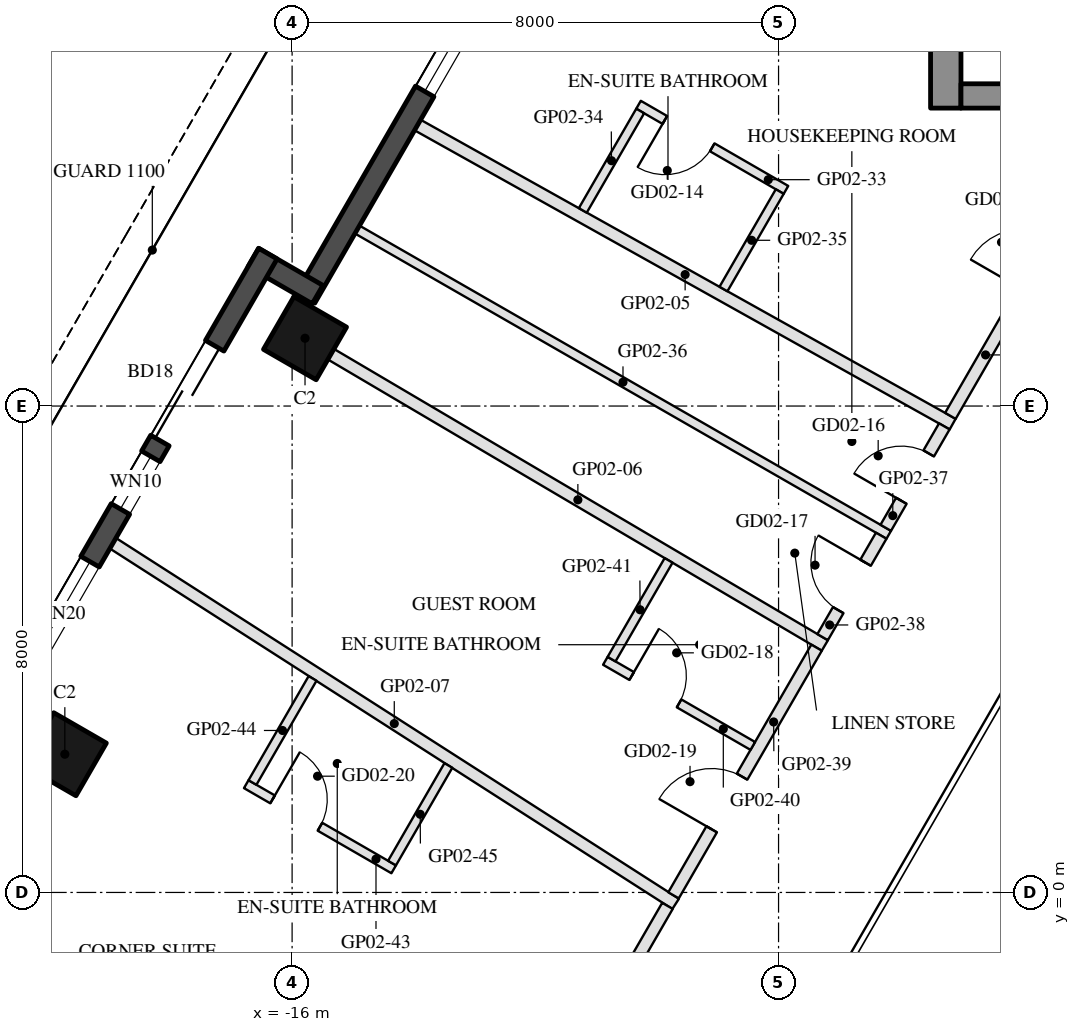
"""IFC4 building model, lengths in metres.
Left out: names, types, materials, properties, quantities, classifications, styles, units other than length and angle.
Written with IfcOpenShell. Run it as: python <this file> out.ifc"""

import sys

from ifc_helpers import new_model, si_unit, direction, frame, frame_2d, origin, origin_2d, place, context, subcontext, project, spatial, rectangle, hollow_rectangle, extrude, element, fill, save


model = new_model("IFC4")
c1 = context("Model", 3, precision=1e-05, world=origin(), true_north=direction((0.0, 1.0)))
c2 = subcontext(c1, "Body", "Model", "MODEL_VIEW")
j1 = project(units=[si_unit("LENGTHUNIT", "METRE"), si_unit("PLANEANGLEUNIT", "RADIAN")], contexts=[c1])
p1 = place(None, origin())
s1 = spatial("IfcSite", under=j1, at=p1, CompositionType="ELEMENT")
p2 = place(p1, origin())
s2 = spatial("IfcBuilding", under=s1, at=p2, CompositionType="ELEMENT")
p3 = place(p2, frame((0.0, 0.0, 57.6)))
s3 = spatial("IfcBuildingStorey", under=s2, at=p3, CompositionType="ELEMENT", Elevation=57.6)
for number, where, z_axis, x_axis in (
    (1, (-15.788, 9.115, 0.0), (0.0, 0.0, 1.0), (0.5, 0.866, 0.0)),
    (2, (-19.738, 2.273, 0.0), (0.0, 0.0, 1.0), (0.5, 0.866, 0.0)),
):
    element("IfcColumn", number, at=place(p3, frame(where, z_axis=z_axis, x_axis=x_axis)), inside=s3, PredefinedType="COLUMN", context=c2, shape_type="SweptSolid", body=[
        extrude(hollow_rectangle(XDim=1.0, YDim=1.0, WallThickness=0.045, at=origin_2d()), origin(), (0.0, 0.0, 1.0), 3.7),
    ])
p4 = place(p3, frame((-12.409, 15.617, 0.0), z_axis=(0.0, 0.0, 1.0), x_axis=(-0.500003597184, -0.866023326939, 0.0)))
e3 = element("IfcWall", 3, at=p4, inside=s3, PredefinedType="SOLIDWALL", context=c2, shape_type="SweptSolid", body=[
    extrude(rectangle(XDim=6.74, YDim=0.35, at=frame_2d((3.37, 0.0))), origin(), (0.0, 0.0, 1.0), 3.55),
])
p5 = place(p4, frame((0.32, 0.0, 0.3)))
e4 = element("IfcOpeningElement", 4, at=p5, cuts=e3, PredefinedType="OPENING", context=c2, shape_type="SweptSolid", body=[
    extrude(rectangle(XDim=2.5, YDim=2.65, at=frame_2d((1.25, 1.325))), frame((0.0, 0.185, 0.0), z_axis=(0.0, -1.0, 0.0), x_axis=(1.0, 0.0, 0.0)), (0.0, 0.0, 1.0), 0.37),
])
p6 = place(p3, frame((-15.581, 9.833, 0.0), z_axis=(0.0, 0.0, 1.0), x_axis=(-0.866055662726, 0.499947586314, 0.0)))
e5 = element("IfcWall", 5, at=p6, inside=s3, PredefinedType="SOLIDWALL", context=c2, shape_type="SweptSolid", body=[
    extrude(rectangle(XDim=1.22, YDim=0.35, at=frame_2d((0.61, 0.0))), origin(), (0.0, 0.0, 1.0), 3.55),
])
p7 = place(p3, frame((-16.398, 10.507, 0.0), z_axis=(0.0, 0.0, 1.0), x_axis=(-0.499999142773, -0.866025898704, 0.0)))
e6 = element("IfcWall", 6, at=p7, inside=s3, PredefinedType="SOLIDWALL", context=c2, shape_type="SweptSolid", body=[
    extrude(rectangle(XDim=9.7, YDim=0.35, at=frame_2d((4.85, 0.0))), origin(), (0.0, 0.0, 1.0), 3.55),
])
p8 = place(p7, frame((1.75, 0.0, 0.0)))
e7 = element("IfcOpeningElement", 7, at=p8, cuts=e6, PredefinedType="OPENING", context=c2, shape_type="SweptSolid", body=[
    extrude(rectangle(XDim=1.8, YDim=2.4, at=frame_2d((0.9, 1.2))), frame((0.0, 0.185, 0.0), z_axis=(0.0, -1.0, 0.0), x_axis=(1.0, 0.0, 0.0)), (0.0, 0.0, 1.0), 0.37),
])
p9 = place(p7, frame((3.85, 0.0, 0.3)))
e8 = element("IfcOpeningElement", 8, at=p9, cuts=e6, PredefinedType="OPENING", context=c2, shape_type="SweptSolid", body=[
    extrude(rectangle(XDim=1.0, YDim=2.65, at=frame_2d((0.5, 1.325))), frame((0.0, 0.185, 0.0), z_axis=(0.0, -1.0, 0.0), x_axis=(1.0, 0.0, 0.0)), (0.0, 0.0, 1.0), 0.37),
])
p10 = place(p7, frame((5.85, 0.0, 0.3)))
e9 = element("IfcOpeningElement", 9, at=p10, cuts=e6, PredefinedType="OPENING", context=c2, shape_type="SweptSolid", body=[
    extrude(rectangle(XDim=2.0, YDim=2.65, at=frame_2d((1.0, 1.325))), frame((0.0, 0.185, 0.0), z_axis=(0.0, -1.0, 0.0), x_axis=(1.0, 0.0, 0.0)), (0.0, 0.0, 1.0), 0.37),
])
p11 = place(p3, frame((-5.25, 12.9, 0.0), z_axis=(0.0, 0.0, 1.0), x_axis=(0.0, 1.0, 0.0)))
e10 = element("IfcWall", 10, at=p11, inside=s3, PredefinedType="SHEAR", context=c2, shape_type="SweptSolid", body=[
    extrude(rectangle(XDim=14.837, YDim=0.5, at=frame_2d((7.418, 0.0))), origin(), (0.0, 0.0, 1.0), 3.5),
])
p12 = place(p3, frame((5.0, 13.1, 0.0), z_axis=(0.0, 0.0, 1.0), x_axis=(-1.0, 0.0, 0.0)))
e11 = element("IfcWall", 11, at=p12, inside=s3, PredefinedType="SHEAR", context=c2, shape_type="SweptSolid", body=[
    extrude(rectangle(XDim=10.0, YDim=0.4, at=frame_2d((5.0, 0.0))), origin(), (0.0, 0.0, 1.0), 3.5),
])
p13 = place(p12, frame((3.55, 0.0, 0.0)))
e12 = element("IfcOpeningElement", 12, at=p13, cuts=e11, PredefinedType="OPENING", context=c2, shape_type="SweptSolid", body=[
    extrude(rectangle(XDim=1.1, YDim=2.1, at=frame_2d((0.55, 1.05))), frame((0.0, 0.21, 0.0), z_axis=(0.0, -1.0, 0.0), x_axis=(1.0, 0.0, 0.0)), (0.0, 0.0, 1.0), 0.42),
])
p14 = place(p12, frame((5.85, 0.0, 0.0)))
e13 = element("IfcOpeningElement", 13, at=p14, cuts=e11, PredefinedType="OPENING", context=c2, shape_type="SweptSolid", body=[
    extrude(rectangle(XDim=1.4, YDim=2.1, at=frame_2d((0.7, 1.05))), frame((0.0, 0.21, 0.0), z_axis=(0.0, -1.0, 0.0), x_axis=(1.0, 0.0, 0.0)), (0.0, 0.0, 1.0), 0.42),
])
p15 = place(p3, frame((-13.936, 12.622, 0.0), z_axis=(0.0, 0.0, 1.0), x_axis=(0.872898889426, -0.487901146585, 0.0)))
e14 = element("IfcWall", 14, at=p15, inside=s3, PredefinedType="PARTITIONING", context=c2, shape_type="SweptSolid", body=[
    extrude(rectangle(XDim=10.081, YDim=0.2, at=frame_2d((5.041, 0.0))), origin(), (0.0, 0.0, 1.0), 2.95),
])
p16 = place(p3, frame((-15.362, 8.853, 0.0), z_axis=(0.0, 0.0, 1.0), x_axis=(0.861347313363, -0.508016540835, 0.0)))
e15 = element("IfcWall", 15, at=p16, inside=s3, PredefinedType="PARTITIONING", context=c2, shape_type="SweptSolid", body=[
    extrude(rectangle(XDim=9.43, YDim=0.2, at=frame_2d((4.715, 0.0))), origin(), (0.0, 0.0, 1.0), 2.95),
])
p17 = place(p3, frame((-18.947, 5.743, 0.0), z_axis=(0.0, 0.0, 1.0), x_axis=(0.84192674528, -0.539591841657, 0.0)))
e16 = element("IfcWall", 16, at=p17, inside=s3, PredefinedType="PARTITIONING", context=c2, shape_type="SweptSolid", body=[
    extrude(rectangle(XDim=10.992, YDim=0.2, at=frame_2d((5.496, 0.0))), origin(), (0.0, 0.0, 1.0), 2.96),
])
p18 = place(p3, frame((-5.174, 7.838, 0.0), z_axis=(0.0, 0.0, 1.0), x_axis=(0.499973220989, 0.866040864101, 0.0)))
e17 = element("IfcWall", 17, at=p18, inside=s3, PredefinedType="PARTITIONING", context=c2, shape_type="SweptSolid", body=[
    extrude(rectangle(XDim=5.787, YDim=0.2, at=frame_2d((2.894, 0.0))), origin(), (0.0, 0.0, 1.0), 2.95),
])
p19 = place(p18, frame((2.393, 0.0, 0.0)))
e18 = element("IfcOpeningElement", 18, at=p19, cuts=e17, PredefinedType="OPENING", context=c2, shape_type="SweptSolid", body=[
    extrude(rectangle(XDim=1.0, YDim=2.1, at=frame_2d((0.5, 1.05))), frame((0.0, 0.11, 0.0), z_axis=(0.0, -1.0, 0.0), x_axis=(1.0, 0.0, 0.0)), (0.0, 0.0, 1.0), 0.22),
])
p20 = place(p3, frame((-7.878, 11.555, 0.0), z_axis=(0.0, 0.0, 1.0), x_axis=(-0.865996816683, 0.500049511043, 0.0)))
e19 = element("IfcWall", 19, at=p20, inside=s3, PredefinedType="PARTITIONING", context=c2, shape_type="SweptSolid", body=[
    extrude(rectangle(XDim=2.8, YDim=0.15, at=frame_2d((1.4, 0.0))), origin(), (0.0, 0.0, 1.0), 3.55),
])
p21 = place(p20, frame((1.4, 0.0, 0.0)))
e20 = element("IfcOpeningElement", 20, at=p21, cuts=e19, PredefinedType="OPENING", context=c2, shape_type="SweptSolid", body=[
    extrude(rectangle(XDim=0.9, YDim=2.1, at=frame_2d((0.45, 1.05))), frame((0.0, 0.085, 0.0), z_axis=(0.0, -1.0, 0.0), x_axis=(1.0, 0.0, 0.0)), (0.0, 0.0, 1.0), 0.17),
])
p22 = place(p3, frame((-10.275, 12.853, 0.0), z_axis=(0.0, 0.0, 1.0), x_axis=(-0.499950073403, -0.866054227, 0.0)))
e21 = element("IfcWall", 21, at=p22, inside=s3, PredefinedType="PARTITIONING", context=c2, shape_type="SweptSolid", body=[
    extrude(rectangle(XDim=1.888, YDim=0.15, at=frame_2d((0.944, 0.0))), origin(), (0.0, 0.0, 1.0), 3.55),
])
p23 = place(p3, frame((-7.98, 11.528, 0.0), z_axis=(0.0, 0.0, 1.0), x_axis=(-0.500011685716, -0.866018656928, 0.0)))
e22 = element("IfcWall", 22, at=p23, inside=s3, PredefinedType="PARTITIONING", context=c2, shape_type="SweptSolid", body=[
    extrude(rectangle(XDim=1.851, YDim=0.15, at=frame_2d((0.926, 0.0))), origin(), (0.0, 0.0, 1.0), 3.55),
])
p24 = place(p3, frame((-14.929, 10.902, 0.0), z_axis=(0.0, 0.0, 1.0), x_axis=(0.867191892367, -0.497974117614, 0.0)))
e23 = element("IfcWall", 23, at=p24, inside=s3, PredefinedType="PARTITIONING", context=c2, shape_type="SweptSolid", body=[
    extrude(rectangle(XDim=10.08, YDim=0.15, at=frame_2d((5.04, 0.0))), origin(), (0.0, 0.0, 1.0), 2.96),
])
p25 = place(p3, frame((-6.237, 5.997, 0.0), z_axis=(0.0, 0.0, 1.0), x_axis=(0.500051616692, 0.865995600822, 0.0)))
e24 = element("IfcWall", 24, at=p25, inside=s3, PredefinedType="PARTITIONING", context=c2, shape_type="SweptSolid", body=[
    extrude(rectangle(XDim=1.926, YDim=0.2, at=frame_2d((0.963, 0.0))), origin(), (0.0, 0.0, 1.0), 2.95),
])
p26 = place(p25, frame((0.513, 0.0, 0.0)))
e25 = element("IfcOpeningElement", 25, at=p26, cuts=e24, PredefinedType="OPENING", context=c2, shape_type="SweptSolid", body=[
    extrude(rectangle(XDim=0.9, YDim=2.1, at=frame_2d((0.45, 1.05))), frame((0.0, 0.11, 0.0), z_axis=(0.0, -1.0, 0.0), x_axis=(1.0, 0.0, 0.0)), (0.0, 0.0, 1.0), 0.22),
])
p27 = place(p3, frame((-7.275, 4.199, 0.0), z_axis=(0.0, 0.0, 1.0), x_axis=(0.500051616692, 0.865995600822, 0.0)))
e26 = element("IfcWall", 26, at=p27, inside=s3, PredefinedType="PARTITIONING", context=c2, shape_type="SweptSolid", body=[
    extrude(rectangle(XDim=1.926, YDim=0.2, at=frame_2d((0.963, 0.0))), origin(), (0.0, 0.0, 1.0), 2.95),
])
p28 = place(p27, frame((0.513, 0.0, 0.0)))
e27 = element("IfcOpeningElement", 27, at=p28, cuts=e26, PredefinedType="OPENING", context=c2, shape_type="SweptSolid", body=[
    extrude(rectangle(XDim=0.9, YDim=2.1, at=frame_2d((0.45, 1.05))), frame((0.0, 0.11, 0.0), z_axis=(0.0, -1.0, 0.0), x_axis=(1.0, 0.0, 0.0)), (0.0, 0.0, 1.0), 0.22),
])
p29 = place(p3, frame((-9.727, -0.047, 0.0), z_axis=(0.0, 0.0, 1.0), x_axis=(0.500019002036, 0.866014432676, 0.0)))
e28 = element("IfcWall", 28, at=p29, inside=s3, PredefinedType="PARTITIONING", context=c2, shape_type="SweptSolid", body=[
    extrude(rectangle(XDim=4.703, YDim=0.2, at=frame_2d((2.352, 0.0))), origin(), (0.0, 0.0, 1.0), 2.95),
])
p30 = place(p29, frame((1.254, 0.0, 0.0)))
e29 = element("IfcOpeningElement", 29, at=p30, cuts=e28, PredefinedType="OPENING", context=c2, shape_type="SweptSolid", body=[
    extrude(rectangle(XDim=1.0, YDim=2.1, at=frame_2d((0.5, 1.05))), frame((0.0, 0.11, 0.0), z_axis=(0.0, -1.0, 0.0), x_axis=(1.0, 0.0, 0.0)), (0.0, 0.0, 1.0), 0.22),
])
p31 = place(p3, frame((-10.849, 3.81, 0.0), z_axis=(0.0, 0.0, 1.0), x_axis=(0.866018616679, -0.500011755427, 0.0)))
e30 = element("IfcWall", 30, at=p31, inside=s3, PredefinedType="PARTITIONING", context=c2, shape_type="SweptSolid", body=[
    extrude(rectangle(XDim=2.8, YDim=0.15, at=frame_2d((1.4, 0.0))), origin(), (0.0, 0.0, 1.0), 3.55),
])
p32 = place(p31, frame((0.5, 0.0, 0.0)))
e31 = element("IfcOpeningElement", 31, at=p32, cuts=e30, PredefinedType="OPENING", context=c2, shape_type="SweptSolid", body=[
    extrude(rectangle(XDim=0.9, YDim=2.1, at=frame_2d((0.45, 1.05))), frame((0.0, 0.085, 0.0), z_axis=(0.0, -1.0, 0.0), x_axis=(1.0, 0.0, 0.0)), (0.0, 0.0, 1.0), 0.17),
])
p33 = place(p3, frame((-9.809, 5.461, 0.0), z_axis=(0.0, 0.0, 1.0), x_axis=(-0.499947857008, -0.866055506462, 0.0)))
e32 = element("IfcWall", 32, at=p33, inside=s3, PredefinedType="PARTITIONING", context=c2, shape_type="SweptSolid", body=[
    extrude(rectangle(XDim=1.875, YDim=0.15, at=frame_2d((0.938, 0.0))), origin(), (0.0, 0.0, 1.0), 3.55),
])
p34 = place(p3, frame((-12.269, -4.45, 0.0), z_axis=(0.0, 0.0, 1.0), x_axis=(0.500021044785, 0.866013253231, 0.0)))
e33 = element("IfcWall", 33, at=p34, inside=s3, PredefinedType="PARTITIONING", context=c2, shape_type="SweptSolid", body=[
    extrude(rectangle(XDim=4.884, YDim=0.2, at=frame_2d((2.442, 0.0))), origin(), (0.0, 0.0, 1.0), 2.95),
])
p35 = place(p34, frame((1.942, 0.0, 0.0)))
e34 = element("IfcOpeningElement", 34, at=p35, cuts=e33, PredefinedType="OPENING", context=c2, shape_type="SweptSolid", body=[
    extrude(rectangle(XDim=1.0, YDim=2.1, at=frame_2d((0.5, 1.05))), frame((0.0, 0.11, 0.0), z_axis=(0.0, -1.0, 0.0), x_axis=(1.0, 0.0, 0.0)), (0.0, 0.0, 1.0), 0.22),
])
p36 = place(p3, frame((-16.754, 1.781, 0.0), z_axis=(0.0, 0.0, 1.0), x_axis=(0.866056369097, -0.49994636267, 0.0)))
e35 = element("IfcWall", 35, at=p36, inside=s3, PredefinedType="PARTITIONING", context=c2, shape_type="SweptSolid", body=[
    extrude(rectangle(XDim=2.8, YDim=0.15, at=frame_2d((1.4, 0.0))), origin(), (0.0, 0.0, 1.0), 3.55),
])
p37 = place(p36, frame((0.5, 0.0, 0.0)))
e36 = element("IfcOpeningElement", 36, at=p37, cuts=e35, PredefinedType="OPENING", context=c2, shape_type="SweptSolid", body=[
    extrude(rectangle(XDim=0.9, YDim=2.1, at=frame_2d((0.45, 1.05))), frame((0.0, 0.085, 0.0), z_axis=(0.0, -1.0, 0.0), x_axis=(1.0, 0.0, 0.0)), (0.0, 0.0, 1.0), 0.17),
])
p38 = place(p3, frame((-15.664, 3.52, 0.0), z_axis=(0.0, 0.0, 1.0), x_axis=(-0.500018274647, -0.866014852655, 0.0)))
e37 = element("IfcWall", 37, at=p38, inside=s3, PredefinedType="PARTITIONING", context=c2, shape_type="SweptSolid", body=[
    extrude(rectangle(XDim=1.977, YDim=0.15, at=frame_2d((0.988, 0.0))), origin(), (0.0, 0.0, 1.0), 3.55),
])
p39 = place(p3, frame((-13.43, 2.088, 0.0), z_axis=(0.0, 0.0, 1.0), x_axis=(-0.499893495202, -0.866086885627, 0.0)))
e38 = element("IfcWall", 38, at=p39, inside=s3, PredefinedType="PARTITIONING", context=c2, shape_type="SweptSolid", body=[
    extrude(rectangle(XDim=1.854, YDim=0.15, at=frame_2d((0.927, 0.0))), origin(), (0.0, 0.0, 1.0), 3.55),
])
p40 = place(p5, origin())
e39 = element("IfcWindow", 39, at=p40, inside=s3, PartitioningType="SINGLE_PANEL", PredefinedType="WINDOW", context=c2, shape_type="SweptSolid", body=[
    extrude(rectangle(XDim=2.5, YDim=2.65, at=frame_2d((1.25, 1.325))), frame((0.0, 0.03, 0.0), z_axis=(0.0, -1.0, 0.0), x_axis=(1.0, 0.0, 0.0)), (0.0, 0.0, 1.0), 0.06),
])
fill(e4, e39)
p41 = place(p8, frame((1.8, 0.0, 0.0), z_axis=(0.0, 0.0, 1.0), x_axis=(-1.0, 0.0, 0.0)))
e40 = element("IfcDoor", 40, at=p41, inside=s3, OperationType="SLIDING_TO_LEFT", PredefinedType="DOOR", context=c2, shape_type="SweptSolid", body=[
    extrude(rectangle(XDim=1.8, YDim=2.4, at=frame_2d((0.9, 1.2))), frame((0.0, 0.025, 0.0), z_axis=(0.0, -1.0, 0.0), x_axis=(1.0, 0.0, 0.0)), (0.0, 0.0, 1.0), 0.05),
])
fill(e7, e40)
p42 = place(p9, origin())
e41 = element("IfcWindow", 41, at=p42, inside=s3, PartitioningType="SINGLE_PANEL", PredefinedType="WINDOW", context=c2, shape_type="SweptSolid", body=[
    extrude(rectangle(XDim=1.0, YDim=2.65, at=frame_2d((0.5, 1.325))), frame((0.0, 0.03, 0.0), z_axis=(0.0, -1.0, 0.0), x_axis=(1.0, 0.0, 0.0)), (0.0, 0.0, 1.0), 0.06),
])
fill(e8, e41)
p43 = place(p10, origin())
e42 = element("IfcWindow", 42, at=p43, inside=s3, PartitioningType="SINGLE_PANEL", PredefinedType="WINDOW", context=c2, shape_type="SweptSolid", body=[
    extrude(rectangle(XDim=2.0, YDim=2.65, at=frame_2d((1.0, 1.325))), frame((0.0, 0.03, 0.0), z_axis=(0.0, -1.0, 0.0), x_axis=(1.0, 0.0, 0.0)), (0.0, 0.0, 1.0), 0.06),
])
fill(e9, e42)
p44 = place(p21, origin())
e43 = element("IfcDoor", 43, at=p44, inside=s3, OperationType="SINGLE_SWING_RIGHT", PredefinedType="DOOR", context=c2, shape_type="SweptSolid", body=[
    extrude(rectangle(XDim=0.9, YDim=2.1, at=frame_2d((0.45, 1.05))), frame((0.0, 0.025, 0.0), z_axis=(0.0, -1.0, 0.0), x_axis=(1.0, 0.0, 0.0)), (0.0, 0.0, 1.0), 0.05),
])
fill(e20, e43)
p45 = place(p26, origin())
e44 = element("IfcDoor", 44, at=p45, inside=s3, OperationType="SINGLE_SWING_LEFT", PredefinedType="DOOR", context=c2, shape_type="SweptSolid", body=[
    extrude(rectangle(XDim=0.9, YDim=2.1, at=frame_2d((0.45, 1.05))), frame((0.0, 0.025, 0.0), z_axis=(0.0, -1.0, 0.0), x_axis=(1.0, 0.0, 0.0)), (0.0, 0.0, 1.0), 0.05),
])
fill(e25, e44)
p46 = place(p28, origin())
e45 = element("IfcDoor", 45, at=p46, inside=s3, OperationType="SINGLE_SWING_RIGHT", PredefinedType="DOOR", context=c2, shape_type="SweptSolid", body=[
    extrude(rectangle(XDim=0.9, YDim=2.1, at=frame_2d((0.45, 1.05))), frame((0.0, 0.025, 0.0), z_axis=(0.0, -1.0, 0.0), x_axis=(1.0, 0.0, 0.0)), (0.0, 0.0, 1.0), 0.05),
])
fill(e27, e45)
p47 = place(p32, origin())
e46 = element("IfcDoor", 46, at=p47, inside=s3, OperationType="SINGLE_SWING_LEFT", PredefinedType="DOOR", context=c2, shape_type="SweptSolid", body=[
    extrude(rectangle(XDim=0.9, YDim=2.1, at=frame_2d((0.45, 1.05))), frame((0.0, 0.025, 0.0), z_axis=(0.0, -1.0, 0.0), x_axis=(1.0, 0.0, 0.0)), (0.0, 0.0, 1.0), 0.05),
])
fill(e31, e46)
p48 = place(p30, origin())
e47 = element("IfcDoor", 47, at=p48, inside=s3, OperationType="SINGLE_SWING_LEFT", PredefinedType="DOOR", context=c2, shape_type="SweptSolid", body=[
    extrude(rectangle(XDim=1.0, YDim=2.1, at=frame_2d((0.5, 1.05))), frame((0.0, 0.025, 0.0), z_axis=(0.0, -1.0, 0.0), x_axis=(1.0, 0.0, 0.0)), (0.0, 0.0, 1.0), 0.05),
])
fill(e29, e47)
p49 = place(p37, origin())
e48 = element("IfcDoor", 48, at=p49, inside=s3, OperationType="SINGLE_SWING_LEFT", PredefinedType="DOOR", context=c2, shape_type="SweptSolid", body=[
    extrude(rectangle(XDim=0.9, YDim=2.1, at=frame_2d((0.45, 1.05))), frame((0.0, 0.025, 0.0), z_axis=(0.0, -1.0, 0.0), x_axis=(1.0, 0.0, 0.0)), (0.0, 0.0, 1.0), 0.05),
])
fill(e36, e48)
save(model, sys.argv[1])
